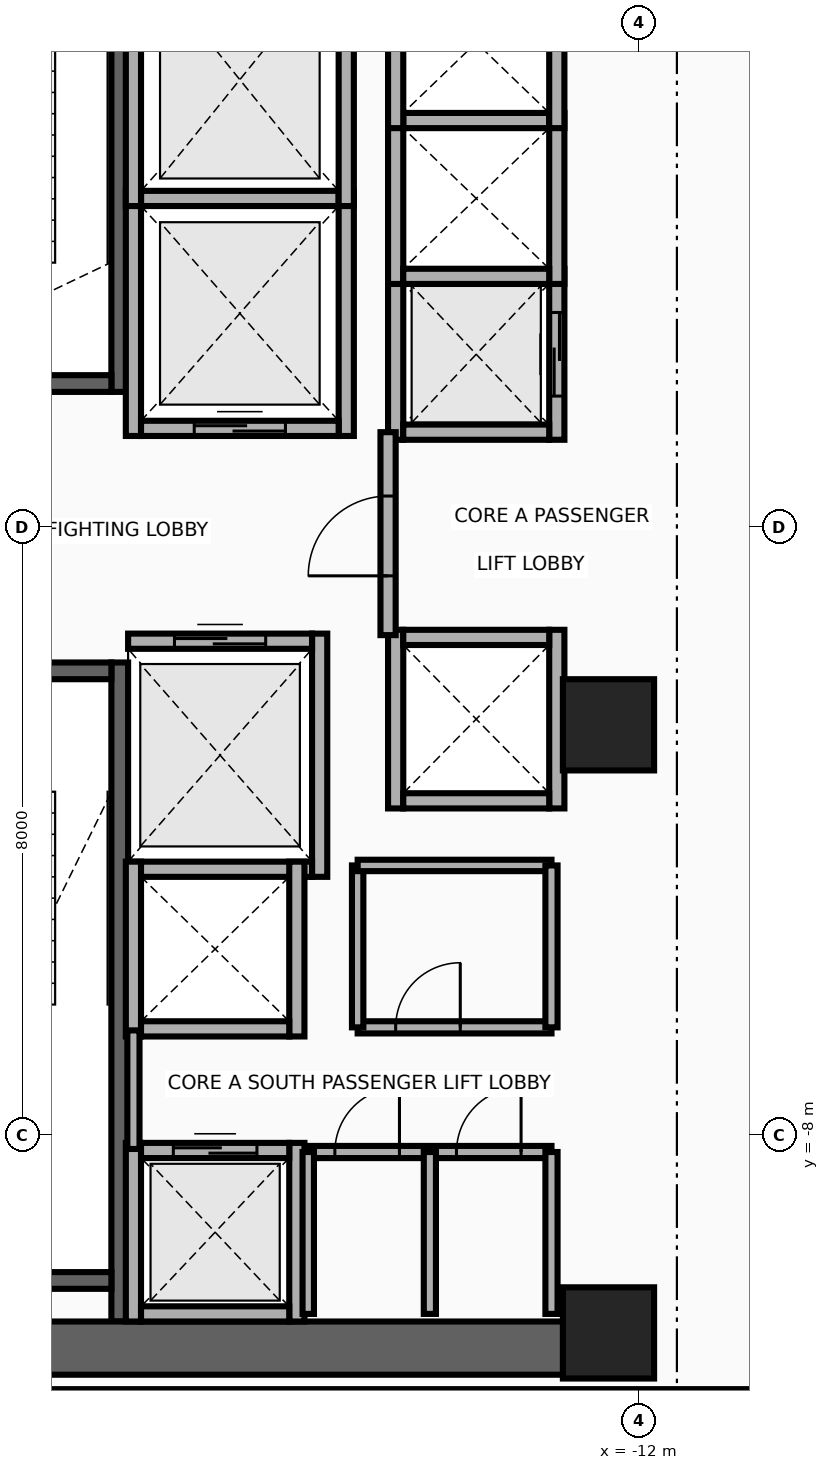
"""IFC4 building model, lengths in metres.
Left out: names, types, materials, properties, quantities, classifications, styles, units other than length and angle.
Written with IfcOpenShell. Run it as: python <this file> out.ifc"""

import sys

from ifc_helpers import new_model, si_unit, direction, frame, frame_2d, origin, origin_2d, place, context, subcontext, project, spatial, rectangle, extrude, source, transform, mapped, element, fill, save


model = new_model("IFC4")
c1 = context("Model", 3, precision=1e-05, world=origin(), true_north=direction((0.0, 1.0)))
c2 = subcontext(c1, "Body", "Model", "MODEL_VIEW")
j1 = project(units=[si_unit("LENGTHUNIT", "METRE"), si_unit("PLANEANGLEUNIT", "RADIAN")], contexts=[c1])
p1 = place(None, origin())
s1 = spatial("IfcSite", under=j1, at=p1, CompositionType="ELEMENT")
p2 = place(p1, origin())
s2 = spatial("IfcBuilding", under=s1, at=p2, CompositionType="ELEMENT")
p3 = place(p2, frame((0.0, 0.0, 146.4)))
s3 = spatial("IfcBuildingStorey", under=s2, at=p3, CompositionType="ELEMENT", Elevation=146.4)
p4 = place(p3, frame((-18.83, 1.78, 0.0), z_axis=(0.0, 0.0, 1.0), x_axis=(0.0, 1.0, 0.0)))
e1 = element("IfcWall", 1, at=p4, inside=s3, PredefinedType="SHEAR", context=c2, shape_type="SweptSolid", body=[
    extrude(rectangle(XDim=8.67, YDim=0.22, at=frame_2d((4.335, 0.0))), origin(), (0.0, 0.0, 1.0), 3.46),
])
p5 = place(p3, frame((-22.05, 1.89, 0.0), z_axis=(0.0, 0.0, 1.0), x_axis=(1.0, 0.0, 0.0)))
e2 = element("IfcWall", 2, at=p5, inside=s3, PredefinedType="SHEAR", context=c2, shape_type="SweptSolid", body=[
    extrude(rectangle(XDim=3.11, YDim=0.22, at=frame_2d((1.555, 0.0))), origin(), (0.0, 0.0, 1.0), 3.46),
])
p6 = place(p5, frame((1.0, 0.0, 0.0)))
e3 = element("IfcOpeningElement", 3, at=p6, cuts=e2, PredefinedType="OPENING", context=c2, shape_type="SweptSolid", body=[
    extrude(rectangle(XDim=1.1, YDim=2.15, at=frame_2d((0.55, 1.075))), frame((0.0, 0.125, 0.0), z_axis=(0.0, -1.0, 0.0), x_axis=(1.0, 0.0, 0.0)), (0.0, 0.0, 1.0), 0.25),
])
p7 = place(p3, frame((-18.83, -10.45, 0.0), z_axis=(0.0, 0.0, 1.0), x_axis=(0.0, 1.0, 0.0)))
e4 = element("IfcWall", 4, at=p7, inside=s3, PredefinedType="SHEAR", context=c2, shape_type="SweptSolid", body=[
    extrude(rectangle(XDim=8.67, YDim=0.22, at=frame_2d((4.335, 0.0))), origin(), (0.0, 0.0, 1.0), 3.46),
])
p8 = place(p3, frame((-22.05, -9.91, 0.0), z_axis=(0.0, 0.0, 1.0), x_axis=(1.0, 0.0, 0.0)))
e5 = element("IfcWall", 5, at=p8, inside=s3, PredefinedType="SHEAR", context=c2, shape_type="SweptSolid", body=[
    extrude(rectangle(XDim=3.11, YDim=0.22, at=frame_2d((1.555, 0.0))), origin(), (0.0, 0.0, 1.0), 3.46),
])
p9 = place(p3, frame((-22.05, -1.89, 0.0), z_axis=(0.0, 0.0, 1.0), x_axis=(1.0, 0.0, 0.0)))
e6 = element("IfcWall", 6, at=p9, inside=s3, PredefinedType="SHEAR", context=c2, shape_type="SweptSolid", body=[
    extrude(rectangle(XDim=3.11, YDim=0.22, at=frame_2d((1.555, 0.0))), origin(), (0.0, 0.0, 1.0), 3.46),
])
p10 = place(p9, frame((1.0, 0.0, 0.0)))
e7 = element("IfcOpeningElement", 7, at=p10, cuts=e6, PredefinedType="OPENING", context=c2, shape_type="SweptSolid", body=[
    extrude(rectangle(XDim=1.1, YDim=2.15, at=frame_2d((0.55, 1.075))), frame((0.0, 0.125, 0.0), z_axis=(0.0, -1.0, 0.0), x_axis=(1.0, 0.0, 0.0)), (0.0, 0.0, 1.0), 0.25),
])
p11 = place(p3, frame((-22.65, -10.8, 0.0), z_axis=(0.0, 0.0, 1.0), x_axis=(1.0, 0.0, 0.0)))
e8 = element("IfcWall", 8, at=p11, inside=s3, PredefinedType="SHEAR", context=c2, shape_type="SweptSolid", body=[
    extrude(rectangle(XDim=10.25, YDim=0.7, at=frame_2d((5.125, 0.0))), origin(), (0.0, 0.0, 1.0), 3.46),
])
m1 = source(origin(), c2, "Body", "SweptSolid", [
    extrude(rectangle(XDim=1.2, YDim=1.2, at=origin_2d()), origin(), (0.0, 0.0, 1.0), 3.7),
])
for number, where, z_axis, x_axis in (
    (9, (-12.4, -10.6, 0.0), (0.0, 0.0, 1.0), (1.0, 0.0, 0.0)),
    (10, (-12.4, -2.6, 0.0), (0.0, 0.0, 1.0), (1.0, 0.0, 0.0)),
):
    element("IfcColumn", number, at=place(p3, frame(where, z_axis=z_axis, x_axis=x_axis)), inside=s3, PredefinedType="COLUMN", context=c2, shape_type="MappedRepresentation", body=[
        mapped(m1, transform((0.0, 0.0, 0.0), x_axis=(1.0, 0.0, 0.0), y_axis=(0.0, 1.0, 0.0), z_axis=(0.0, 0.0, 1.0), scale=1.0)),
    ])
for number, where, z_axis, x_axis in (
    (11, (-18.65, 1.2, 0.0), (0.0, 0.0, 1.0), (0.0, 1.0, 0.0)),
    (12, (-15.85, 1.2, 0.0), (0.0, 0.0, 1.0), (0.0, 1.0, 0.0)),
):
    element("IfcWall", number, at=place(p3, frame(where, z_axis=z_axis, x_axis=x_axis)), inside=s3, PredefinedType="MOVABLE", context=c2, shape_type="SweptSolid", body=[
        extrude(rectangle(XDim=3.225, YDim=0.2, at=frame_2d((1.613, 0.0))), origin(), (0.0, 0.0, 1.0), 3.46),
    ])
p12 = place(p3, frame((-18.55, 1.3, 0.0), z_axis=(0.0, 0.0, 1.0), x_axis=(1.0, 0.0, 0.0)))
e13 = element("IfcWall", 13, at=p12, inside=s3, PredefinedType="MOVABLE", context=c2, shape_type="SweptSolid", body=[
    extrude(rectangle(XDim=2.6, YDim=0.2, at=frame_2d((1.3, 0.0))), origin(), (0.0, 0.0, 1.0), 3.46),
])
p13 = place(p12, frame((0.7, 0.0, 0.0)))
e14 = element("IfcOpeningElement", 14, at=p13, cuts=e13, PredefinedType="OPENING", context=c2, shape_type="SweptSolid", body=[
    extrude(rectangle(XDim=1.2, YDim=2.1, at=frame_2d((0.6, 1.05))), frame((0.0, 0.115, 0.0), z_axis=(0.0, -1.0, 0.0), x_axis=(1.0, 0.0, 0.0)), (0.0, 0.0, 1.0), 0.23),
])
p14 = place(p3, frame((-18.55, 4.325, 0.0), z_axis=(0.0, 0.0, 1.0), x_axis=(1.0, 0.0, 0.0)))
e15 = element("IfcWall", 15, at=p14, inside=s3, PredefinedType="MOVABLE", context=c2, shape_type="SweptSolid", body=[
    extrude(rectangle(XDim=2.6, YDim=0.2, at=frame_2d((1.3, 0.0))), origin(), (0.0, 0.0, 1.0), 3.46),
])
p15 = place(p3, frame((-16.2, -4.6, 0.0), z_axis=(0.0, 0.0, 1.0), x_axis=(0.0, 1.0, 0.0)))
e16 = element("IfcWall", 16, at=p15, inside=s3, PredefinedType="MOVABLE", context=c2, shape_type="SweptSolid", body=[
    extrude(rectangle(XDim=3.2, YDim=0.2, at=frame_2d((1.6, 0.0))), origin(), (0.0, 0.0, 1.0), 3.46),
])
p16 = place(p3, frame((-18.72, -4.5, 0.0), z_axis=(0.0, 0.0, 1.0), x_axis=(1.0, 0.0, 0.0)))
e17 = element("IfcWall", 17, at=p16, inside=s3, PredefinedType="MOVABLE", context=c2, shape_type="SweptSolid", body=[
    extrude(rectangle(XDim=2.42, YDim=0.2, at=frame_2d((1.21, 0.0))), origin(), (0.0, 0.0, 1.0), 3.46),
])
p17 = place(p3, frame((-18.72, -1.5, 0.0), z_axis=(0.0, 0.0, 1.0), x_axis=(1.0, 0.0, 0.0)))
e18 = element("IfcWall", 18, at=p17, inside=s3, PredefinedType="MOVABLE", context=c2, shape_type="SweptSolid", body=[
    extrude(rectangle(XDim=2.42, YDim=0.2, at=frame_2d((1.21, 0.0))), origin(), (0.0, 0.0, 1.0), 3.46),
])
p18 = place(p17, frame((0.61, 0.0, 0.0)))
e19 = element("IfcOpeningElement", 19, at=p18, cuts=e18, PredefinedType="OPENING", context=c2, shape_type="SweptSolid", body=[
    extrude(rectangle(XDim=1.2, YDim=2.1, at=frame_2d((0.6, 1.05))), frame((0.0, 0.115, 0.0), z_axis=(0.0, -1.0, 0.0), x_axis=(1.0, 0.0, 0.0)), (0.0, 0.0, 1.0), 0.23),
])
for number, where, z_axis, x_axis in (
    (20, (-18.65, 4.225, 0.0), (0.0, 0.0, 1.0), (0.0, 1.0, 0.0)),
    (21, (-15.85, 4.225, 0.0), (0.0, 0.0, 1.0), (0.0, 1.0, 0.0)),
):
    element("IfcWall", number, at=place(p3, frame(where, z_axis=z_axis, x_axis=x_axis)), inside=s3, PredefinedType="MOVABLE", context=c2, shape_type="SweptSolid", body=[
        extrude(rectangle(XDim=3.325, YDim=0.2, at=frame_2d((1.663, 0.0))), origin(), (0.0, 0.0, 1.0), 3.46),
    ])
for number, where, z_axis, x_axis in (
    (22, (-18.65, -10.45, 0.0), (0.0, 0.0, 1.0), (0.0, 1.0, 0.0)),
    (23, (-16.5, -10.45, 0.0), (0.0, 0.0, 1.0), (0.0, 1.0, 0.0)),
):
    element("IfcWall", number, at=place(p3, frame(where, z_axis=z_axis, x_axis=x_axis)), inside=s3, PredefinedType="MOVABLE", context=c2, shape_type="SweptSolid", body=[
        extrude(rectangle(XDim=2.35, YDim=0.2, at=frame_2d((1.175, 0.0))), origin(), (0.0, 0.0, 1.0), 2.666),
    ])
p19 = place(p3, frame((-18.55, -10.35, 0.0), z_axis=(0.0, 0.0, 1.0), x_axis=(1.0, 0.0, 0.0)))
e24 = element("IfcWall", 24, at=p19, inside=s3, PredefinedType="MOVABLE", context=c2, shape_type="SweptSolid", body=[
    extrude(rectangle(XDim=1.95, YDim=0.2, at=frame_2d((0.975, 0.0))), origin(), (0.0, 0.0, 1.0), 2.666),
])
p20 = place(p3, frame((-18.55, -8.2, 0.0), z_axis=(0.0, 0.0, 1.0), x_axis=(1.0, 0.0, 0.0)))
e25 = element("IfcWall", 25, at=p20, inside=s3, PredefinedType="MOVABLE", context=c2, shape_type="SweptSolid", body=[
    extrude(rectangle(XDim=1.95, YDim=0.2, at=frame_2d((0.975, 0.0))), origin(), (0.0, 0.0, 1.0), 3.46),
])
p21 = place(p20, frame((0.425, 0.0, 0.0)))
e26 = element("IfcOpeningElement", 26, at=p21, cuts=e25, PredefinedType="OPENING", context=c2, shape_type="SweptSolid", body=[
    extrude(rectangle(XDim=1.1, YDim=2.1, at=frame_2d((0.55, 1.05))), frame((0.0, 0.115, 0.0), z_axis=(0.0, -1.0, 0.0), x_axis=(1.0, 0.0, 0.0)), (0.0, 0.0, 1.0), 0.23),
])
p22 = place(p3, frame((-15.2, 1.15, 0.0), z_axis=(0.0, 0.0, 1.0), x_axis=(0.0, 1.0, 0.0)))
e27 = element("IfcWall", 27, at=p22, inside=s3, PredefinedType="MOVABLE", context=c2, shape_type="SweptSolid", body=[
    extrude(rectangle(XDim=2.25, YDim=0.2, at=frame_2d((1.125, 0.0))), origin(), (0.0, 0.0, 1.0), 3.46),
])
p23 = place(p3, frame((-13.08, 1.15, 0.0), z_axis=(0.0, 0.0, 1.0), x_axis=(0.0, 1.0, 0.0)))
e28 = element("IfcWall", 28, at=p23, inside=s3, PredefinedType="MOVABLE", context=c2, shape_type="SweptSolid", body=[
    extrude(rectangle(XDim=2.25, YDim=0.2, at=frame_2d((1.125, 0.0))), origin(), (0.0, 0.0, 1.0), 3.46),
])
p24 = place(p23, frame((0.575, 0.0, 0.0)))
e29 = element("IfcOpeningElement", 29, at=p24, cuts=e28, PredefinedType="OPENING", context=c2, shape_type="SweptSolid", body=[
    extrude(rectangle(XDim=1.1, YDim=2.1, at=frame_2d((0.55, 1.05))), frame((0.0, 0.115, 0.0), z_axis=(0.0, -1.0, 0.0), x_axis=(1.0, 0.0, 0.0)), (0.0, 0.0, 1.0), 0.23),
])
p25 = place(p3, frame((-15.1, 1.25, 0.0), z_axis=(0.0, 0.0, 1.0), x_axis=(1.0, 0.0, 0.0)))
e30 = element("IfcWall", 30, at=p25, inside=s3, PredefinedType="MOVABLE", context=c2, shape_type="SweptSolid", body=[
    extrude(rectangle(XDim=1.92, YDim=0.2, at=frame_2d((0.96, 0.0))), origin(), (0.0, 0.0, 1.0), 3.46),
])
for number, where, z_axis, x_axis in (
    (31, (-15.2, 3.2, 0.0), (0.0, 0.0, 1.0), (0.0, 1.0, 0.0)),
    (32, (-13.08, 3.2, 0.0), (0.0, 0.0, 1.0), (0.0, 1.0, 0.0)),
):
    element("IfcWall", number, at=place(p3, frame(where, z_axis=z_axis, x_axis=x_axis)), inside=s3, PredefinedType="MOVABLE", context=c2, shape_type="SweptSolid", body=[
        extrude(rectangle(XDim=2.25, YDim=0.2, at=frame_2d((1.125, 0.0))), origin(), (0.0, 0.0, 1.0), 3.46),
    ])
for number, where, z_axis, x_axis in (
    (33, (-15.1, 3.3, 0.0), (0.0, 0.0, 1.0), (1.0, 0.0, 0.0)),
    (34, (-15.1, 5.35, 0.0), (0.0, 0.0, 1.0), (1.0, 0.0, 0.0)),
):
    element("IfcWall", number, at=place(p3, frame(where, z_axis=z_axis, x_axis=x_axis)), inside=s3, PredefinedType="MOVABLE", context=c2, shape_type="SweptSolid", body=[
        extrude(rectangle(XDim=1.92, YDim=0.2, at=frame_2d((0.96, 0.0))), origin(), (0.0, 0.0, 1.0), 3.46),
    ])
for number, where, z_axis, x_axis in (
    (35, (-15.2, 5.25, 0.0), (0.0, 0.0, 1.0), (0.0, 1.0, 0.0)),
    (36, (-13.08, 5.25, 0.0), (0.0, 0.0, 1.0), (0.0, 1.0, 0.0)),
):
    element("IfcWall", number, at=place(p3, frame(where, z_axis=z_axis, x_axis=x_axis)), inside=s3, PredefinedType="MOVABLE", context=c2, shape_type="SweptSolid", body=[
        extrude(rectangle(XDim=2.25, YDim=0.2, at=frame_2d((1.125, 0.0))), origin(), (0.0, 0.0, 1.0), 3.46),
    ])
for number, where, z_axis, x_axis in (
    (37, (-18.65, -6.7, 0.0), (0.0, 0.0, 1.0), (0.0, 1.0, 0.0)),
    (38, (-16.5, -6.7, 0.0), (0.0, 0.0, 1.0), (0.0, 1.0, 0.0)),
):
    element("IfcWall", number, at=place(p3, frame(where, z_axis=z_axis, x_axis=x_axis)), inside=s3, PredefinedType="MOVABLE", context=c2, shape_type="SweptSolid", body=[
        extrude(rectangle(XDim=2.3, YDim=0.2, at=frame_2d((1.15, 0.0))), origin(), (0.0, 0.0, 1.0), 3.46),
    ])
p26 = place(p3, frame((-18.55, -6.6, 0.0), z_axis=(0.0, 0.0, 1.0), x_axis=(1.0, 0.0, 0.0)))
e39 = element("IfcWall", 39, at=p26, inside=s3, PredefinedType="MOVABLE", context=c2, shape_type="SweptSolid", body=[
    extrude(rectangle(XDim=1.95, YDim=0.2, at=frame_2d((0.975, 0.0))), origin(), (0.0, 0.0, 1.0), 3.46),
])
for number, where, z_axis, x_axis in (
    (40, (-15.2, -3.7, 0.0), (0.0, 0.0, 1.0), (0.0, 1.0, 0.0)),
    (41, (-13.08, -3.7, 0.0), (0.0, 0.0, 1.0), (0.0, 1.0, 0.0)),
):
    element("IfcWall", number, at=place(p3, frame(where, z_axis=z_axis, x_axis=x_axis)), inside=s3, PredefinedType="MOVABLE", context=c2, shape_type="SweptSolid", body=[
        extrude(rectangle(XDim=2.35, YDim=0.2, at=frame_2d((1.175, 0.0))), origin(), (0.0, 0.0, 1.0), 3.46),
    ])
for number, where, z_axis, x_axis in (
    (42, (-15.1, -3.6, 0.0), (0.0, 0.0, 1.0), (1.0, 0.0, 0.0)),
    (43, (-15.1, -1.45, 0.0), (0.0, 0.0, 1.0), (1.0, 0.0, 0.0)),
):
    element("IfcWall", number, at=place(p3, frame(where, z_axis=z_axis, x_axis=x_axis)), inside=s3, PredefinedType="MOVABLE", context=c2, shape_type="SweptSolid", body=[
        extrude(rectangle(XDim=1.92, YDim=0.2, at=frame_2d((0.96, 0.0))), origin(), (0.0, 0.0, 1.0), 3.46),
    ])
p27 = place(p3, frame((-15.3, -1.42, 0.0), z_axis=(0.0, 0.0, 1.0), x_axis=(0.0, 1.0, 0.0)))
e44 = element("IfcWall", 44, at=p27, inside=s3, PredefinedType="PARTITIONING", context=c2, shape_type="SweptSolid", body=[
    extrude(rectangle(XDim=2.67, YDim=0.2, at=frame_2d((1.335, 0.0))), origin(), (0.0, 0.0, 1.0), 3.46),
])
p28 = place(p27, frame((0.78, 0.0, 0.0)))
e45 = element("IfcOpeningElement", 45, at=p28, cuts=e44, PredefinedType="OPENING", context=c2, shape_type="SweptSolid", body=[
    extrude(rectangle(XDim=1.05, YDim=2.15, at=frame_2d((0.525, 1.075))), frame((0.0, 0.115, 0.0), z_axis=(0.0, -1.0, 0.0), x_axis=(1.0, 0.0, 0.0)), (0.0, 0.0, 1.0), 0.23),
])
p29 = place(p3, frame((-18.65, -8.18, 0.0), z_axis=(0.0, 0.0, 1.0), x_axis=(0.0, 1.0, 0.0)))
e46 = element("IfcWall", 46, at=p29, inside=s3, PredefinedType="PARTITIONING", context=c2, shape_type="SweptSolid", body=[
    extrude(rectangle(XDim=1.56, YDim=0.16, at=frame_2d((0.78, 0.0))), origin(), (0.0, 0.0, 1.0), 3.46),
])
p30 = place(p3, frame((-16.35, -8.22, 0.0), z_axis=(0.0, 0.0, 1.0), x_axis=(1.0, 0.0, 0.0)))
e47 = element("IfcWall", 47, at=p30, inside=s3, PredefinedType="PARTITIONING", context=c2, shape_type="SweptSolid", body=[
    extrude(rectangle(XDim=3.2, YDim=0.16, at=frame_2d((1.6, 0.0))), origin(), (0.0, 0.0, 1.0), 3.46),
])
p31 = place(p30, frame((0.35, 0.0, 0.0)))
e48 = element("IfcOpeningElement", 48, at=p31, cuts=e47, PredefinedType="OPENING", context=c2, shape_type="SweptSolid", body=[
    extrude(rectangle(XDim=0.85, YDim=2.05, at=frame_2d((0.425, 1.025))), frame((0.0, 0.095, 0.0), z_axis=(0.0, -1.0, 0.0), x_axis=(1.0, 0.0, 0.0)), (0.0, 0.0, 1.0), 0.19),
])
p32 = place(p30, frame((1.95, 0.0, 0.0)))
e49 = element("IfcOpeningElement", 49, at=p32, cuts=e47, PredefinedType="OPENING", context=c2, shape_type="SweptSolid", body=[
    extrude(rectangle(XDim=0.85, YDim=2.05, at=frame_2d((0.425, 1.025))), frame((0.0, 0.095, 0.0), z_axis=(0.0, -1.0, 0.0), x_axis=(1.0, 0.0, 0.0)), (0.0, 0.0, 1.0), 0.19),
])
p33 = place(p3, frame((-16.35, -10.35, 0.0), z_axis=(0.0, 0.0, 1.0), x_axis=(0.0, 1.0, 0.0)))
e50 = element("IfcWall", 50, at=p33, inside=s3, PredefinedType="PARTITIONING", context=c2, shape_type="SweptSolid", body=[
    extrude(rectangle(XDim=2.13, YDim=0.15, at=frame_2d((1.065, 0.0))), origin(), (0.0, 0.0, 1.0), 3.46),
])
for number, where, z_axis, x_axis in (
    (51, (-13.15, -10.35, 0.0), (0.0, 0.0, 1.0), (0.0, 1.0, 0.0)),
    (52, (-14.75, -10.35, 0.0), (0.0, 0.0, 1.0), (0.0, 1.0, 0.0)),
):
    element("IfcWall", number, at=place(p3, frame(where, z_axis=z_axis, x_axis=x_axis)), inside=s3, PredefinedType="PARTITIONING", context=c2, shape_type="SweptSolid", body=[
        extrude(rectangle(XDim=2.13, YDim=0.16, at=frame_2d((1.065, 0.0))), origin(), (0.0, 0.0, 1.0), 3.46),
    ])
p34 = place(p3, frame((-15.7, -6.58, 0.0), z_axis=(0.0, 0.0, 1.0), x_axis=(1.0, 0.0, 0.0)))
e53 = element("IfcWall", 53, at=p34, inside=s3, PredefinedType="PARTITIONING", context=c2, shape_type="SweptSolid", body=[
    extrude(rectangle(XDim=2.55, YDim=0.16, at=frame_2d((1.275, 0.0))), origin(), (0.0, 0.0, 1.0), 3.46),
])
p35 = place(p34, frame((0.5, 0.0, 0.0)))
e54 = element("IfcOpeningElement", 54, at=p35, cuts=e53, PredefinedType="OPENING", context=c2, shape_type="SweptSolid", body=[
    extrude(rectangle(XDim=0.85, YDim=2.05, at=frame_2d((0.425, 1.025))), frame((0.0, 0.095, 0.0), z_axis=(0.0, -1.0, 0.0), x_axis=(1.0, 0.0, 0.0)), (0.0, 0.0, 1.0), 0.19),
])
p36 = place(p3, frame((-15.7, -6.58, 0.0), z_axis=(0.0, 0.0, 1.0), x_axis=(0.0, 1.0, 0.0)))
e55 = element("IfcWall", 55, at=p36, inside=s3, PredefinedType="PARTITIONING", context=c2, shape_type="SweptSolid", body=[
    extrude(rectangle(XDim=2.13, YDim=0.15, at=frame_2d((1.065, 0.0))), origin(), (0.0, 0.0, 1.0), 3.46),
])
p37 = place(p3, frame((-15.7, -4.45, 0.0), z_axis=(0.0, 0.0, 1.0), x_axis=(1.0, 0.0, 0.0)))
e56 = element("IfcWall", 56, at=p37, inside=s3, PredefinedType="PARTITIONING", context=c2, shape_type="SweptSolid", body=[
    extrude(rectangle(XDim=2.55, YDim=0.15, at=frame_2d((1.275, 0.0))), origin(), (0.0, 0.0, 1.0), 3.46),
])
p38 = place(p3, frame((-13.15, -6.58, 0.0), z_axis=(0.0, 0.0, 1.0), x_axis=(0.0, 1.0, 0.0)))
e57 = element("IfcWall", 57, at=p38, inside=s3, PredefinedType="PARTITIONING", context=c2, shape_type="SweptSolid", body=[
    extrude(rectangle(XDim=2.13, YDim=0.16, at=frame_2d((1.065, 0.0))), origin(), (0.0, 0.0, 1.0), 3.46),
])
p39 = place(p3, frame((-23.45, -11.42, 0.0), z_axis=(0.0, 0.0, 1.0), x_axis=(1.0, 0.0, 0.0)))
e58 = element("IfcWall", 58, at=p39, inside=s3, PredefinedType="PARTITIONING", context=c2, shape_type="SweptSolid", body=[
    extrude(rectangle(XDim=13.84, YDim=0.16, at=frame_2d((6.92, 0.0))), origin(), (0.0, 0.0, 1.0), 2.834),
])
p40 = place(p13, origin())
e59 = element("IfcDoor", 59, at=p40, inside=s3, OperationType="DOUBLE_DOOR_SLIDING", PredefinedType="DOOR", context=c2, shape_type="SweptSolid", body=[
    extrude(rectangle(XDim=1.2, YDim=2.1, at=frame_2d((0.6, 1.05))), frame((0.0, 0.025, 0.0), z_axis=(0.0, -1.0, 0.0), x_axis=(1.0, 0.0, 0.0)), (0.0, 0.0, 1.0), 0.05),
])
fill(e14, e59)
p41 = place(p18, origin())
e60 = element("IfcDoor", 60, at=p41, inside=s3, OperationType="DOUBLE_DOOR_SLIDING", PredefinedType="DOOR", context=c2, shape_type="SweptSolid", body=[
    extrude(rectangle(XDim=1.2, YDim=2.1, at=frame_2d((0.6, 1.05))), frame((0.0, 0.025, 0.0), z_axis=(0.0, -1.0, 0.0), x_axis=(1.0, 0.0, 0.0)), (0.0, 0.0, 1.0), 0.05),
])
fill(e19, e60)
p42 = place(p21, origin())
e61 = element("IfcDoor", 61, at=p42, inside=s3, OperationType="DOUBLE_DOOR_SLIDING", PredefinedType="DOOR", context=c2, shape_type="SweptSolid", body=[
    extrude(rectangle(XDim=1.1, YDim=2.1, at=frame_2d((0.55, 1.05))), frame((0.0, 0.025, 0.0), z_axis=(0.0, -1.0, 0.0), x_axis=(1.0, 0.0, 0.0)), (0.0, 0.0, 1.0), 0.05),
])
fill(e26, e61)
p43 = place(p24, origin())
e62 = element("IfcDoor", 62, at=p43, inside=s3, OperationType="DOUBLE_DOOR_SLIDING", PredefinedType="DOOR", context=c2, shape_type="SweptSolid", body=[
    extrude(rectangle(XDim=1.1, YDim=2.1, at=frame_2d((0.55, 1.05))), frame((0.0, 0.025, 0.0), z_axis=(0.0, -1.0, 0.0), x_axis=(1.0, 0.0, 0.0)), (0.0, 0.0, 1.0), 0.05),
])
fill(e29, e62)
p44 = place(p28, origin())
e63 = element("IfcDoor", 63, at=p44, inside=s3, OperationType="SINGLE_SWING_RIGHT", PredefinedType="DOOR", context=c2, shape_type="SweptSolid", body=[
    extrude(rectangle(XDim=1.05, YDim=2.15, at=frame_2d((0.525, 1.075))), frame((0.0, 0.025, 0.0), z_axis=(0.0, -1.0, 0.0), x_axis=(1.0, 0.0, 0.0)), (0.0, 0.0, 1.0), 0.05),
])
fill(e45, e63)
p45 = place(p31, origin())
e64 = element("IfcDoor", 64, at=p45, inside=s3, OperationType="SINGLE_SWING_RIGHT", PredefinedType="DOOR", context=c2, shape_type="SweptSolid", body=[
    extrude(rectangle(XDim=0.85, YDim=2.05, at=frame_2d((0.425, 1.025))), frame((0.0, 0.025, 0.0), z_axis=(0.0, -1.0, 0.0), x_axis=(1.0, 0.0, 0.0)), (0.0, 0.0, 1.0), 0.05),
])
fill(e48, e64)
p46 = place(p32, origin())
e65 = element("IfcDoor", 65, at=p46, inside=s3, OperationType="SINGLE_SWING_LEFT", PredefinedType="DOOR", context=c2, shape_type="SweptSolid", body=[
    extrude(rectangle(XDim=0.85, YDim=2.05, at=frame_2d((0.425, 1.025))), frame((0.0, 0.025, 0.0), z_axis=(0.0, -1.0, 0.0), x_axis=(1.0, 0.0, 0.0)), (0.0, 0.0, 1.0), 0.05),
])
fill(e49, e65)
p47 = place(p35, origin())
e66 = element("IfcDoor", 66, at=p47, inside=s3, OperationType="SINGLE_SWING_RIGHT", PredefinedType="DOOR", context=c2, shape_type="SweptSolid", body=[
    extrude(rectangle(XDim=0.85, YDim=2.05, at=frame_2d((0.425, 1.025))), frame((0.0, 0.025, 0.0), z_axis=(0.0, -1.0, 0.0), x_axis=(1.0, 0.0, 0.0)), (0.0, 0.0, 1.0), 0.05),
])
fill(e54, e66)
save(model, sys.argv[1])
